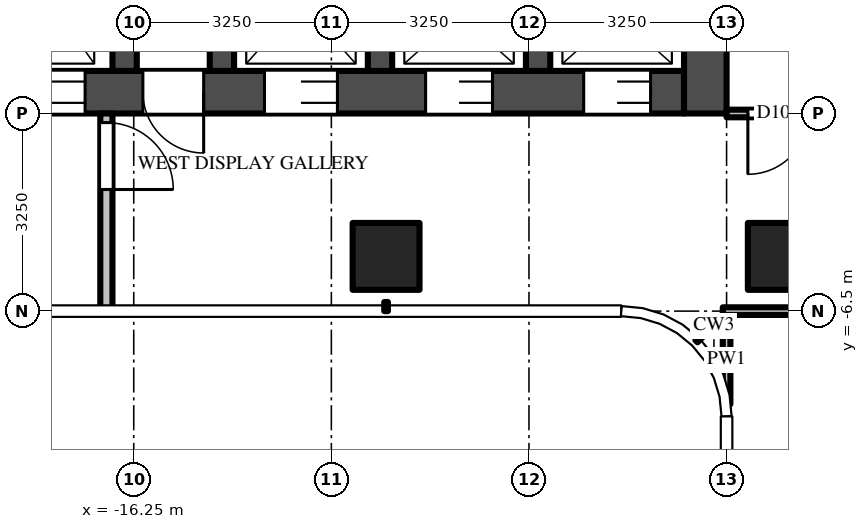
"""IFC4 building model, lengths in metres.
Left out: names, types, materials, properties, quantities, classifications, styles, units other than length and angle.
Written with IfcOpenShell. Run it as: python <this file> out.ifc"""

import sys

from ifc_helpers import new_model, si_unit, direction, frame, frame_2d, origin, origin_2d, place, context, subcontext, project, spatial, rectangle, extrude, source, transform, mapped, element, fill, save


model = new_model("IFC4")
c1 = context("Model", 3, precision=1e-05, world=origin(), true_north=direction((0.0, 1.0)))
c2 = subcontext(c1, "Body", "Model", "MODEL_VIEW")
j1 = project(units=[si_unit("LENGTHUNIT", "METRE"), si_unit("PLANEANGLEUNIT", "RADIAN")], contexts=[c1])
p1 = place(None, origin())
s1 = spatial("IfcSite", under=j1, at=p1, CompositionType="ELEMENT")
p2 = place(p1, origin())
s2 = spatial("IfcBuilding", under=s1, at=p2, CompositionType="ELEMENT")
p3 = place(p2, frame((0.0, 0.0, 240.2)))
s3 = spatial("IfcBuildingStorey", under=s2, at=p3, CompositionType="ELEMENT", Elevation=240.2)
m1 = source(origin(), c2, "Body", "SweptSolid", [
    extrude(rectangle(XDim=1.1, YDim=1.1, at=origin_2d()), origin(), (0.0, 0.0, 1.0), 3.9),
])
for number, where, z_axis, x_axis in (
    (1, (-5.6, -5.6, 0.0), (0.0, 0.0, 1.0), (1.0, 0.0, 0.0)),
    (2, (-12.1, -5.6, 0.0), (0.0, 0.0, 1.0), (1.0, 0.0, 0.0)),
):
    element("IfcColumn", number, at=place(p3, frame(where, z_axis=z_axis, x_axis=x_axis)), inside=s3, PredefinedType="COLUMN", context=c2, shape_type="MappedRepresentation", body=[
        mapped(m1, transform((0.0, 0.0, 0.0))),
    ])
m2 = source(origin(), c2, "Body", "SweptSolid", [
    extrude(rectangle(XDim=14.85, YDim=0.7, at=frame_2d((7.425, 0.0))), origin(), (0.0, 0.0, 1.0), 3.7),
])
p4 = place(p3, frame((-7.2, -2.9, 0.0), z_axis=(0.0, 0.0, 1.0), x_axis=(-1.0, 0.0, 0.0)))
e3 = element("IfcWall", 3, at=p4, inside=s3, PredefinedType="SHEAR", context=c2, shape_type="MappedRepresentation", body=[
    mapped(m2, transform((0.0, 0.0, 0.0))),
])
m3 = source(origin(), c2, "Body", "SweptSolid", [
    extrude(rectangle(XDim=1.1, YDim=2.1, at=frame_2d((0.55, 1.05))), frame((0.0, 0.36, 0.0), z_axis=(0.0, -1.0, 0.0), x_axis=(1.0, 0.0, 0.0)), (0.0, 0.0, 1.0), 0.72),
])
p5 = place(p4, frame((0.55, 0.0, 0.0)))
e4 = element("IfcOpeningElement", 4, at=p5, cuts=e3, PredefinedType="OPENING", context=c2, shape_type="MappedRepresentation", body=[
    mapped(m3, transform((0.0, 0.0, 0.0))),
])
p6 = place(p4, frame((3.15, 0.0, 0.0)))
e5 = element("IfcOpeningElement", 5, at=p6, cuts=e3, PredefinedType="OPENING", context=c2, shape_type="MappedRepresentation", body=[
    mapped(m3, transform((0.0, 0.0, 0.0))),
])
m4 = source(origin(), c2, "Body", "SweptSolid", [
    extrude(rectangle(XDim=1.2, YDim=2.1, at=frame_2d((0.6, 1.05))), frame((0.0, 0.36, 0.0), z_axis=(0.0, -1.0, 0.0), x_axis=(1.0, 0.0, 0.0)), (0.0, 0.0, 1.0), 0.72),
])
p7 = place(p4, frame((5.7, 0.0, 0.0)))
e6 = element("IfcOpeningElement", 6, at=p7, cuts=e3, PredefinedType="OPENING", context=c2, shape_type="MappedRepresentation", body=[
    mapped(m4, transform((0.0, 0.0, 0.0))),
])
m5 = source(origin(), c2, "Body", "SweptSolid", [
    extrude(rectangle(XDim=1.3, YDim=2.1, at=frame_2d((0.65, 1.05))), frame((0.0, 0.36, 0.0), z_axis=(0.0, -1.0, 0.0), x_axis=(1.0, 0.0, 0.0)), (0.0, 0.0, 1.0), 0.72),
])
p8 = place(p4, frame((12.2, 0.0, 0.0)))
e7 = element("IfcOpeningElement", 7, at=p8, cuts=e3, PredefinedType="OPENING", context=c2, shape_type="MappedRepresentation", body=[
    mapped(m5, transform((0.0, 0.0, 0.0))),
])
p9 = place(p4, frame((9.85, 0.0, 0.0)))
e8 = element("IfcOpeningElement", 8, at=p9, cuts=e3, PredefinedType="OPENING", context=c2, shape_type="MappedRepresentation", body=[
    mapped(m4, transform((0.0, 0.0, 0.0))),
])
m6 = source(origin(), c2, "Body", "SweptSolid", [
    extrude(rectangle(XDim=1.0, YDim=2.1, at=frame_2d((0.5, 1.05))), frame((0.0, 0.36, 0.0), z_axis=(0.0, -1.0, 0.0), x_axis=(1.0, 0.0, 0.0)), (0.0, 0.0, 1.0), 0.72),
])
p10 = place(p4, frame((7.9, 0.0, 0.0)))
e9 = element("IfcOpeningElement", 9, at=p10, cuts=e3, PredefinedType="OPENING", context=c2, shape_type="MappedRepresentation", body=[
    mapped(m6, transform((0.0, 0.0, 0.0))),
])
m7 = source(origin(), c2, "Body", "SweptSolid", [
    extrude(rectangle(XDim=9.05, YDim=0.7, at=frame_2d((4.525, 0.0))), origin(), (0.0, 0.0, 1.0), 3.7),
])
p11 = place(p3, frame((-6.85, 5.8, 0.0), z_axis=(0.0, 0.0, 1.0), x_axis=(0.0, -1.0, 0.0)))
e10 = element("IfcWall", 10, at=p11, inside=s3, PredefinedType="SHEAR", context=c2, shape_type="MappedRepresentation", body=[
    mapped(m7, transform((0.0, 0.0, 0.0))),
])
m8 = source(origin(), c2, "Body", "SweptSolid", [
    extrude(rectangle(XDim=1.8, YDim=2.1, at=frame_2d((0.9, 1.05))), frame((0.0, 0.36, 0.0), z_axis=(0.0, -1.0, 0.0), x_axis=(1.0, 0.0, 0.0)), (0.0, 0.0, 1.0), 0.72),
])
p12 = place(p11, frame((3.15, 0.0, 0.0)))
e11 = element("IfcOpeningElement", 11, at=p12, cuts=e10, PredefinedType="OPENING", context=c2, shape_type="MappedRepresentation", body=[
    mapped(m8, transform((0.0, 0.0, 0.0))),
])
m9 = source(origin(), c2, "Body", "SweptSolid", [
    extrude(rectangle(XDim=2.45, YDim=0.4, at=frame_2d((1.225, 0.0))), origin(), (0.0, 0.0, 1.0), 3.7),
])
for number, where, z_axis, x_axis in (
    (12, (-9.6, -0.1, 0.0), (0.0, 0.0, 1.0), (0.0, -1.0, 0.0)),
    (13, (-12.2, -0.1, 0.0), (0.0, 0.0, 1.0), (0.0, -1.0, 0.0)),
    (14, (-14.8, -0.1, 0.0), (0.0, 0.0, 1.0), (0.0, -1.0, 0.0)),
    (15, (-16.4, -0.1, 0.0), (0.0, 0.0, 1.0), (0.0, -1.0, 0.0)),
):
    element("IfcWall", number, at=place(p3, frame(where, z_axis=z_axis, x_axis=x_axis)), inside=s3, PredefinedType="SHEAR", context=c2, shape_type="MappedRepresentation", body=[
        mapped(m9, transform((0.0, 0.0, 0.0))),
    ])
m10 = source(origin(), c2, "Body", "SweptSolid", [
    extrude(rectangle(XDim=3.25, YDim=0.2, at=frame_2d((1.625, 0.0))), origin(), (0.0, 0.0, 1.0), 3.7),
])
p13 = place(p3, frame((-16.7, -3.25, 0.0), z_axis=(0.0, 0.0, 1.0), x_axis=(0.0, -1.0, 0.0)))
e16 = element("IfcWall", 16, at=p13, inside=s3, PredefinedType="PARTITIONING", context=c2, shape_type="MappedRepresentation", body=[
    mapped(m10, transform((0.0, 0.0, 0.0))),
])
m11 = source(origin(), c2, "Body", "SweptSolid", [
    extrude(rectangle(XDim=1.1, YDim=2.1, at=frame_2d((0.55, 1.05))), frame((0.0, 0.11, 0.0), z_axis=(0.0, -1.0, 0.0), x_axis=(1.0, 0.0, 0.0)), (0.0, 0.0, 1.0), 0.22),
])
p14 = place(p13, frame((0.15, 0.0, 0.0)))
e17 = element("IfcOpeningElement", 17, at=p14, cuts=e16, PredefinedType="OPENING", context=c2, shape_type="MappedRepresentation", body=[
    mapped(m11, transform((0.0, 0.0, 0.0))),
])
m12 = source(origin(), c2, "Body", "SweptSolid", [
    extrude(rectangle(XDim=1.469, YDim=0.125, at=frame_2d((0.734, 0.0))), origin(), (0.0, 0.0, 1.0), 3.7),
])
p15 = place(p3, frame((-6.5, -6.562, 0.0), z_axis=(0.0, 0.0, 1.0), x_axis=(0.0, -1.0, 0.0)))
e18 = element("IfcWall", 18, at=p15, inside=s3, PredefinedType="PARTITIONING", context=c2, shape_type="MappedRepresentation", body=[
    mapped(m12, transform((0.0, 0.0, 0.0))),
])
m13 = source(origin(), c2, "Body", "SweptSolid", [
    extrude(rectangle(XDim=3.725, YDim=0.125, at=frame_2d((1.863, 0.0))), origin(), (0.0, 0.0, 1.0), 2.78),
])
p16 = place(p3, frame((-2.837, -6.5, 0.0), z_axis=(0.0, 0.0, 1.0), x_axis=(-1.0, 0.0, 0.0)))
e19 = element("IfcWall", 19, at=p16, inside=s3, PredefinedType="PARTITIONING", context=c2, shape_type="MappedRepresentation", body=[
    mapped(m13, transform((0.0, 0.0, 0.0))),
])
m14 = source(origin(), c2, "Body", "SweptSolid", [
    extrude(rectangle(XDim=5.363, YDim=0.125, at=frame_2d((2.681, 0.0))), origin(), (0.0, 0.0, 1.0), 2.997),
])
p17 = place(p3, frame((-1.137, -3.25, 0.0), z_axis=(0.0, 0.0, 1.0), x_axis=(-1.0, 0.0, 0.0)))
e20 = element("IfcWall", 20, at=p17, inside=s3, PredefinedType="PARTITIONING", context=c2, shape_type="MappedRepresentation", body=[
    mapped(m14, transform((0.0, 0.0, 0.0))),
])
m15 = source(origin(), c2, "Body", "SweptSolid", [
    extrude(rectangle(XDim=1.0, YDim=2.1, at=frame_2d((0.5, 1.05))), frame((0.0, 0.073, 0.0), z_axis=(0.0, -1.0, 0.0), x_axis=(1.0, 0.0, 0.0)), (0.0, 0.0, 1.0), 0.145),
])
p18 = place(p17, frame((4.012, 0.0, 0.0)))
e21 = element("IfcOpeningElement", 21, at=p18, cuts=e20, PredefinedType="OPENING", context=c2, shape_type="MappedRepresentation", body=[
    mapped(m15, transform((0.0, 0.0, 0.0))),
])
m16 = source(origin(), c2, "Body", "SweptSolid", [
    extrude(rectangle(XDim=1.1, YDim=2.1, at=frame_2d((0.55, 1.05))), frame((0.0, -0.275, 0.0), z_axis=(0.0, -1.0, 0.0), x_axis=(1.0, 0.0, 0.0)), (0.0, 0.0, 1.0), 0.05),
])
p19 = place(p5, origin())
e22 = element("IfcDoor", 22, at=p19, inside=s3, OperationType="DOUBLE_DOOR_SLIDING", PredefinedType="DOOR", context=c2, shape_type="MappedRepresentation", body=[
    mapped(m16, transform((0.0, 0.0, 0.0))),
])
fill(e4, e22)
p20 = place(p6, origin())
e23 = element("IfcDoor", 23, at=p20, inside=s3, OperationType="DOUBLE_DOOR_SLIDING", PredefinedType="DOOR", context=c2, shape_type="MappedRepresentation", body=[
    mapped(m16, transform((0.0, 0.0, 0.0))),
])
fill(e5, e23)
m17 = source(origin(), c2, "Body", "SweptSolid", [
    extrude(rectangle(XDim=1.2, YDim=2.1, at=frame_2d((0.6, 1.05))), frame((0.0, -0.275, 0.0), z_axis=(0.0, -1.0, 0.0), x_axis=(1.0, 0.0, 0.0)), (0.0, 0.0, 1.0), 0.05),
])
p21 = place(p7, origin())
e24 = element("IfcDoor", 24, at=p21, inside=s3, OperationType="DOUBLE_DOOR_SLIDING", PredefinedType="DOOR", context=c2, shape_type="MappedRepresentation", body=[
    mapped(m17, transform((0.0, 0.0, 0.0))),
])
fill(e6, e24)
p22 = place(p9, origin())
e25 = element("IfcDoor", 25, at=p22, inside=s3, OperationType="DOUBLE_DOOR_SLIDING", PredefinedType="DOOR", context=c2, shape_type="MappedRepresentation", body=[
    mapped(m17, transform((0.0, 0.0, 0.0))),
])
fill(e8, e25)
m18 = source(origin(), c2, "Body", "SweptSolid", [
    extrude(rectangle(XDim=1.0, YDim=2.1, at=frame_2d((0.5, 1.05))), frame((0.0, -0.275, 0.0), z_axis=(0.0, -1.0, 0.0), x_axis=(1.0, 0.0, 0.0)), (0.0, 0.0, 1.0), 0.05),
])
p23 = place(p10, origin())
e26 = element("IfcDoor", 26, at=p23, inside=s3, OperationType="SINGLE_SWING_LEFT", PredefinedType="DOOR", context=c2, shape_type="MappedRepresentation", body=[
    mapped(m18, transform((0.0, 0.0, 0.0))),
])
fill(e9, e26)
m19 = source(origin(), c2, "Body", "SweptSolid", [
    extrude(rectangle(XDim=1.1, YDim=2.1, at=frame_2d((0.55, 1.05))), frame((0.0, 0.025, 0.0), z_axis=(0.0, -1.0, 0.0), x_axis=(1.0, 0.0, 0.0)), (0.0, 0.0, 1.0), 0.05),
])
p24 = place(p14, origin())
e27 = element("IfcDoor", 27, at=p24, inside=s3, OperationType="SINGLE_SWING_RIGHT", PredefinedType="DOOR", context=c2, shape_type="MappedRepresentation", body=[
    mapped(m19, transform((0.0, 0.0, 0.0))),
])
fill(e17, e27)
m20 = source(origin(), c2, "Body", "SweptSolid", [
    extrude(rectangle(XDim=1.0, YDim=2.1, at=frame_2d((0.5, 1.05))), frame((0.0, 0.025, 0.0), z_axis=(0.0, -1.0, 0.0), x_axis=(1.0, 0.0, 0.0)), (0.0, 0.0, 1.0), 0.05),
])
p25 = place(p18, origin())
e28 = element("IfcDoor", 28, at=p25, inside=s3, OperationType="SINGLE_SWING_RIGHT", PredefinedType="DOOR", context=c2, shape_type="MappedRepresentation", body=[
    mapped(m20, transform((0.0, 0.0, 0.0))),
])
fill(e21, e28)
save(model, sys.argv[1])
